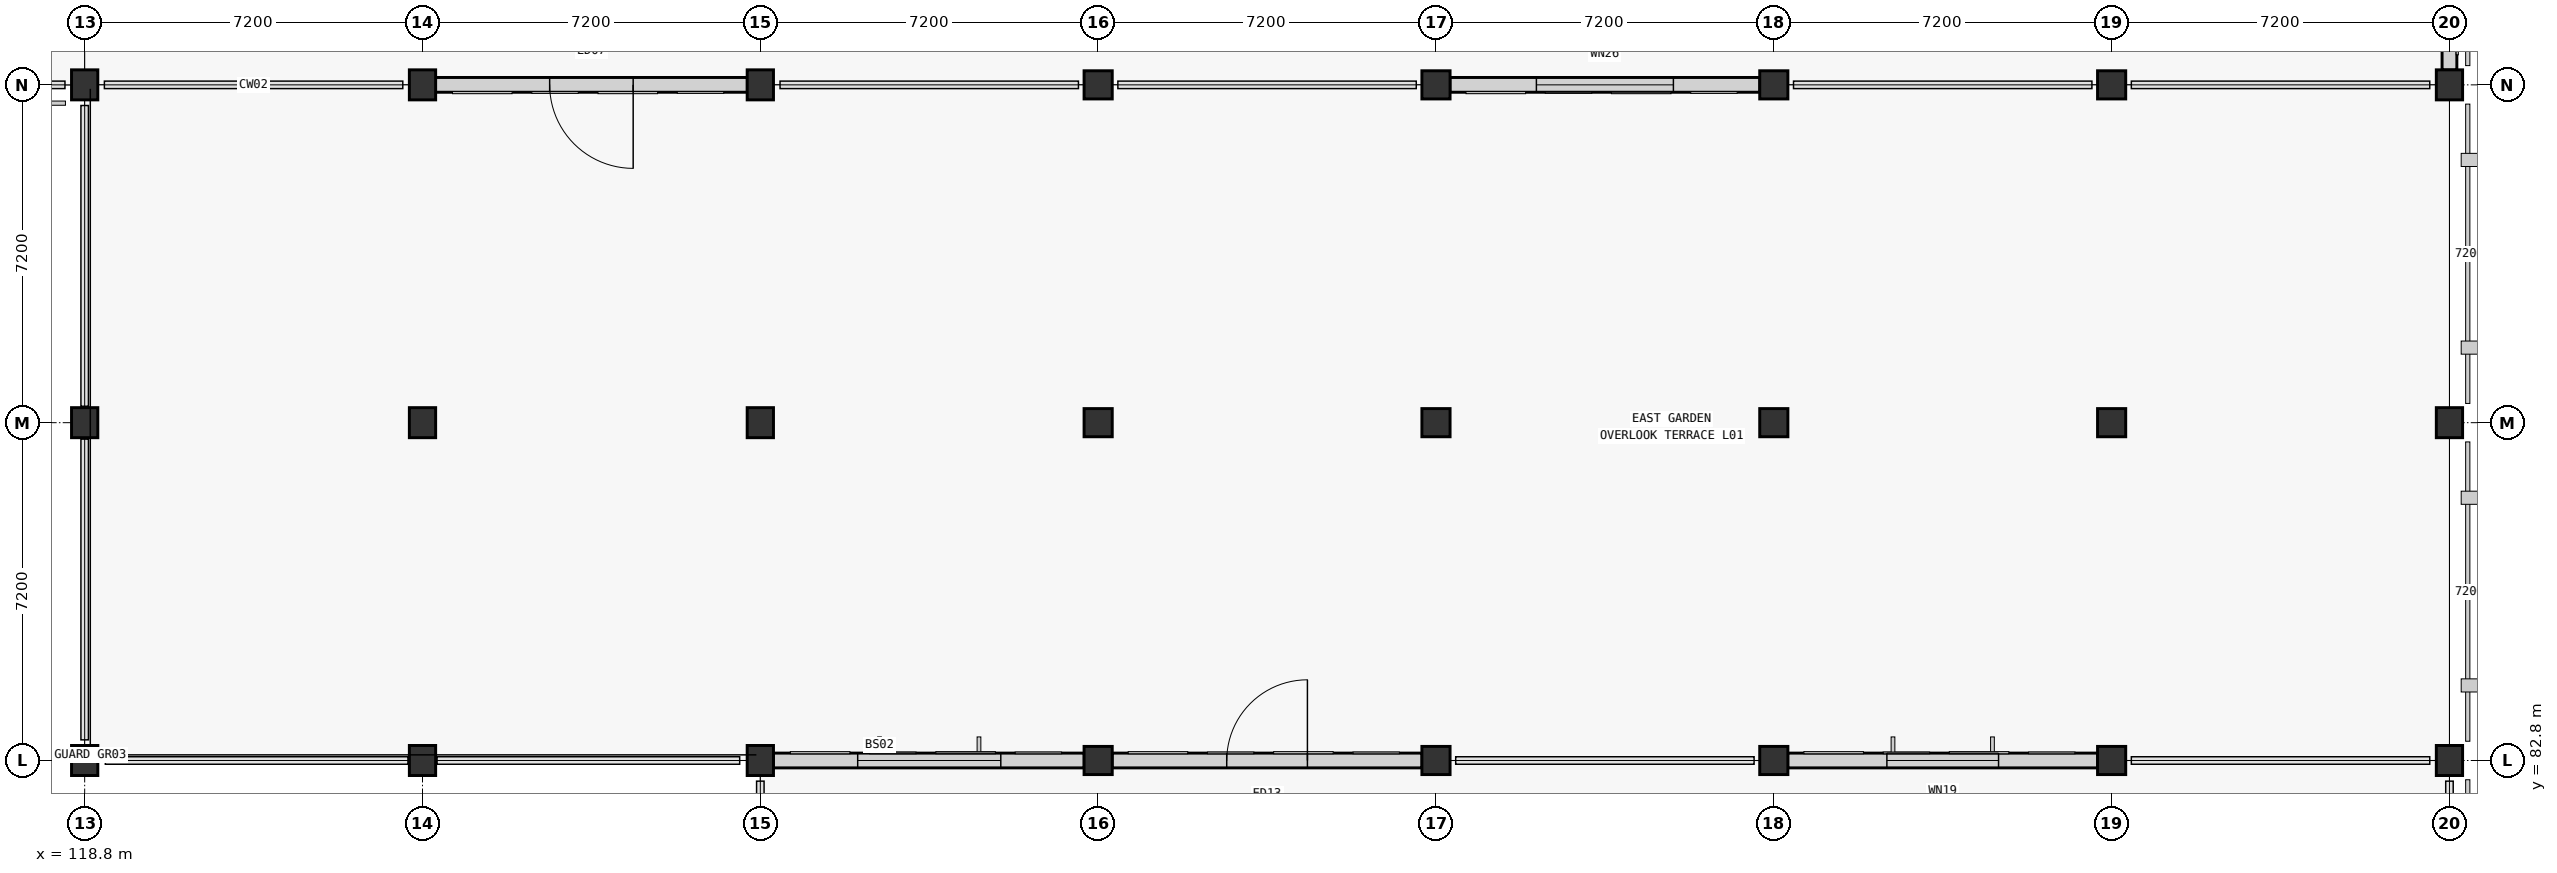
"""IFC4 building model, lengths in metres.
Left out: names, types, materials, properties, quantities, classifications, styles, units other than length and angle.
Written with IfcOpenShell. Run it as: python <this file> out.ifc"""

import sys

from ifc_helpers import new_model, si_unit, direction, frame, frame_2d, origin, origin_2d, place, context, subcontext, project, spatial, rectangle, extrude, element, fill, save


model = new_model("IFC4")
c1 = context("Model", 3, precision=1e-05, world=origin(), true_north=direction((0.0, 1.0)))
c2 = subcontext(c1, "Body", "Model", "MODEL_VIEW")
j1 = project(units=[si_unit("LENGTHUNIT", "METRE"), si_unit("PLANEANGLEUNIT", "RADIAN")], contexts=[c1])
p1 = place(None, origin())
s1 = spatial("IfcSite", under=j1, at=p1, CompositionType="ELEMENT")
p2 = place(p1, origin())
s2 = spatial("IfcBuilding", under=s1, at=p2, CompositionType="ELEMENT")
p3 = place(p2, frame((0.0, 0.0, 5.4)))
s3 = spatial("IfcBuildingStorey", under=s2, at=p3, CompositionType="ELEMENT", Elevation=5.4)
for number, where, z_axis, x_axis in (
    (1, (118.8, 82.8, 0.0), (0.0, 0.0, 1.0), (1.0, 0.0, 0.0)),
    (2, (118.8, 90.0, 0.0), (0.0, 0.0, 1.0), (1.0, 0.0, 0.0)),
    (3, (118.8, 97.2, 0.0), (0.0, 0.0, 1.0), (1.0, 0.0, 0.0)),
    (4, (126.0, 82.8, 0.0), (0.0, 0.0, 1.0), (1.0, 0.0, 0.0)),
    (5, (126.0, 90.0, 0.0), (0.0, 0.0, 1.0), (1.0, 0.0, 0.0)),
    (6, (126.0, 97.2, 0.0), (0.0, 0.0, 1.0), (1.0, 0.0, 0.0)),
    (7, (133.2, 82.8, 0.0), (0.0, 0.0, 1.0), (1.0, 0.0, 0.0)),
    (8, (133.2, 90.0, 0.0), (0.0, 0.0, 1.0), (1.0, 0.0, 0.0)),
    (9, (133.2, 97.2, 0.0), (0.0, 0.0, 1.0), (1.0, 0.0, 0.0)),
):
    element("IfcColumn", number, at=place(p3, frame(where, z_axis=z_axis, x_axis=x_axis)), inside=s3, PredefinedType="COLUMN", context=c2, shape_type="SweptSolid", body=[
        extrude(rectangle(XDim=0.56, YDim=0.64, at=origin_2d()), origin(), (0.0, 0.0, 1.0), 5.4),
    ])
for number, where, z_axis, x_axis in (
    (10, (140.4, 82.8, 0.0), (0.0, 0.0, 1.0), (1.0, 0.0, 0.0)),
    (11, (140.4, 90.0, 0.0), (0.0, 0.0, 1.0), (1.0, 0.0, 0.0)),
    (12, (140.4, 97.2, 0.0), (0.0, 0.0, 1.0), (1.0, 0.0, 0.0)),
    (13, (147.6, 82.8, 0.0), (0.0, 0.0, 1.0), (1.0, 0.0, 0.0)),
    (14, (147.6, 90.0, 0.0), (0.0, 0.0, 1.0), (1.0, 0.0, 0.0)),
    (15, (147.6, 97.2, 0.0), (0.0, 0.0, 1.0), (1.0, 0.0, 0.0)),
    (16, (154.8, 82.8, 0.0), (0.0, 0.0, 1.0), (1.0, 0.0, 0.0)),
    (17, (154.8, 90.0, 0.0), (0.0, 0.0, 1.0), (1.0, 0.0, 0.0)),
    (18, (154.8, 97.2, 0.0), (0.0, 0.0, 1.0), (1.0, 0.0, 0.0)),
    (19, (162.0, 82.8, 0.0), (0.0, 0.0, 1.0), (1.0, 0.0, 0.0)),
    (20, (162.0, 90.0, 0.0), (0.0, 0.0, 1.0), (1.0, 0.0, 0.0)),
    (21, (162.0, 97.2, 0.0), (0.0, 0.0, 1.0), (1.0, 0.0, 0.0)),
):
    element("IfcColumn", number, at=place(p3, frame(where, z_axis=z_axis, x_axis=x_axis)), inside=s3, PredefinedType="COLUMN", context=c2, shape_type="SweptSolid", body=[
        extrude(rectangle(XDim=0.6, YDim=0.6, at=origin_2d()), origin(), (0.0, 0.0, 1.0), 5.4),
    ])
for number, where, z_axis, x_axis in (
    (22, (169.2, 82.8, 0.0), (0.0, 0.0, 1.0), (1.0, 0.0, 0.0)),
    (23, (169.2, 90.0, 0.0), (0.0, 0.0, 1.0), (1.0, 0.0, 0.0)),
    (24, (169.2, 97.2, 0.0), (0.0, 0.0, 1.0), (1.0, 0.0, 0.0)),
):
    element("IfcColumn", number, at=place(p3, frame(where, z_axis=z_axis, x_axis=x_axis)), inside=s3, PredefinedType="COLUMN", context=c2, shape_type="SweptSolid", body=[
        extrude(rectangle(XDim=0.56, YDim=0.64, at=origin_2d()), origin(), (0.0, 0.0, 1.0), 5.4),
    ])
p4 = place(p3, frame((169.2, 104.084, 0.0), z_axis=(0.0, 0.0, 1.0), x_axis=(0.0, -1.0, 0.0)))
e25 = element("IfcWall", 25, at=p4, inside=s3, PredefinedType="STANDARD", context=c2, shape_type="SweptSolid", body=[
    extrude(rectangle(XDim=6.568, YDim=0.315, at=frame_2d((3.284, 0.0))), origin(), (0.0, 0.0, 1.0), 4.515),
])
p5 = place(p4, frame((2.374, 0.0, 0.9)))
e26 = element("IfcOpeningElement", 26, at=p5, cuts=e25, PredefinedType="OPENING", context=c2, shape_type="SweptSolid", body=[
    extrude(rectangle(XDim=1.82, YDim=1.84, at=frame_2d((0.91, 0.92))), frame((0.0, 0.157, 0.0), z_axis=(0.0, -1.0, 0.0), x_axis=(1.0, 0.0, 0.0)), (0.0, 0.0, 1.0), 0.315),
])
p6 = place(p3, frame((132.924, 97.2, 0.0), z_axis=(0.0, 0.0, 1.0), x_axis=(-1.0, 0.0, 0.0)))
e27 = element("IfcWall", 27, at=p6, inside=s3, PredefinedType="STANDARD", context=c2, shape_type="SweptSolid", body=[
    extrude(rectangle(XDim=6.648, YDim=0.315, at=frame_2d((3.324, 0.0))), origin(), (0.0, 0.0, 1.0), 4.475),
])
p7 = place(p6, frame((2.434, 0.0, 0.0)))
e28 = element("IfcOpeningElement", 28, at=p7, cuts=e27, PredefinedType="OPENING", context=c2, shape_type="SweptSolid", body=[
    extrude(rectangle(XDim=1.78, YDim=2.32, at=frame_2d((0.89, 1.16))), frame((0.0, 0.157, 0.0), z_axis=(0.0, -1.0, 0.0), x_axis=(1.0, 0.0, 0.0)), (0.0, 0.0, 1.0), 0.315),
])
p8 = place(p3, frame((154.504, 97.2, 0.0), z_axis=(0.0, 0.0, 1.0), x_axis=(-1.0, 0.0, 0.0)))
e29 = element("IfcWall", 29, at=p8, inside=s3, PredefinedType="STANDARD", context=c2, shape_type="SweptSolid", body=[
    extrude(rectangle(XDim=6.608, YDim=0.315, at=frame_2d((3.304, 0.0))), origin(), (0.0, 0.0, 1.0), 4.475),
])
p9 = place(p8, frame((1.844, 0.0, 0.9)))
e30 = element("IfcOpeningElement", 30, at=p9, cuts=e29, PredefinedType="OPENING", context=c2, shape_type="SweptSolid", body=[
    extrude(rectangle(XDim=2.92, YDim=2.52, at=frame_2d((1.46, 1.26))), frame((0.0, 0.157, 0.0), z_axis=(0.0, -1.0, 0.0), x_axis=(1.0, 0.0, 0.0)), (0.0, 0.0, 1.0), 0.315),
])
p10 = place(p3, frame((133.476, 82.8, 0.0), z_axis=(0.0, 0.0, 1.0), x_axis=(1.0, 0.0, 0.0)))
e31 = element("IfcWall", 31, at=p10, inside=s3, PredefinedType="STANDARD", context=c2, shape_type="SweptSolid", body=[
    extrude(rectangle(XDim=6.628, YDim=0.315, at=frame_2d((3.314, 0.0))), origin(), (0.0, 0.0, 1.0), 4.475),
])
p11 = place(p10, frame((1.799, 0.0, 0.9)))
e32 = element("IfcOpeningElement", 32, at=p11, cuts=e31, PredefinedType="OPENING", context=c2, shape_type="SweptSolid", body=[
    extrude(rectangle(XDim=3.05, YDim=1.62, at=frame_2d((1.525, 0.81))), frame((0.0, 0.157, 0.0), z_axis=(0.0, -1.0, 0.0), x_axis=(1.0, 0.0, 0.0)), (0.0, 0.0, 1.0), 0.315),
])
p12 = place(p3, frame((140.696, 82.8, 0.0), z_axis=(0.0, 0.0, 1.0), x_axis=(1.0, 0.0, 0.0)))
e33 = element("IfcWall", 33, at=p12, inside=s3, PredefinedType="STANDARD", context=c2, shape_type="SweptSolid", body=[
    extrude(rectangle(XDim=6.608, YDim=0.315, at=frame_2d((3.304, 0.0))), origin(), (0.0, 0.0, 1.0), 4.475),
])
p13 = place(p12, frame((2.444, 0.0, 0.0)))
e34 = element("IfcOpeningElement", 34, at=p13, cuts=e33, PredefinedType="OPENING", context=c2, shape_type="SweptSolid", body=[
    extrude(rectangle(XDim=1.72, YDim=2.28, at=frame_2d((0.86, 1.14))), frame((0.0, 0.157, 0.0), z_axis=(0.0, -1.0, 0.0), x_axis=(1.0, 0.0, 0.0)), (0.0, 0.0, 1.0), 0.315),
])
p14 = place(p3, frame((155.096, 82.8, 0.0), z_axis=(0.0, 0.0, 1.0), x_axis=(1.0, 0.0, 0.0)))
e35 = element("IfcWall", 35, at=p14, inside=s3, PredefinedType="STANDARD", context=c2, shape_type="SweptSolid", body=[
    extrude(rectangle(XDim=6.608, YDim=0.315, at=frame_2d((3.304, 0.0))), origin(), (0.0, 0.0, 1.0), 4.475),
])
p15 = place(p14, frame((2.114, 0.0, 0.9)))
e36 = element("IfcOpeningElement", 36, at=p15, cuts=e35, PredefinedType="OPENING", context=c2, shape_type="SweptSolid", body=[
    extrude(rectangle(XDim=2.38, YDim=1.42, at=frame_2d((1.19, 0.71))), frame((0.0, 0.157, 0.0), z_axis=(0.0, -1.0, 0.0), x_axis=(1.0, 0.0, 0.0)), (0.0, 0.0, 1.0), 0.315),
])
p16 = place(p7, origin())
e37 = element("IfcDoor", 37, at=p16, inside=s3, OperationType="SINGLE_SWING_LEFT", PredefinedType="DOOR", context=c2, shape_type="SweptSolid", body=[
    extrude(rectangle(XDim=1.78, YDim=2.32, at=frame_2d((0.89, 1.16))), frame((0.0, 0.025, 0.0), z_axis=(0.0, -1.0, 0.0), x_axis=(1.0, 0.0, 0.0)), (0.0, 0.0, 1.0), 0.05),
])
fill(e28, e37)
p17 = place(p9, origin())
e38 = element("IfcWindow", 38, at=p17, inside=s3, PartitioningType="SINGLE_PANEL", PredefinedType="WINDOW", context=c2, shape_type="SweptSolid", body=[
    extrude(rectangle(XDim=2.92, YDim=2.52, at=frame_2d((1.46, 1.26))), frame((0.0, 0.03, 0.0), z_axis=(0.0, -1.0, 0.0), x_axis=(1.0, 0.0, 0.0)), (0.0, 0.0, 1.0), 0.06),
])
fill(e30, e38)
p18 = place(p11, origin())
e39 = element("IfcWindow", 39, at=p18, inside=s3, PartitioningType="SINGLE_PANEL", PredefinedType="WINDOW", context=c2, shape_type="SweptSolid", body=[
    extrude(rectangle(XDim=3.05, YDim=1.62, at=frame_2d((1.525, 0.81))), frame((0.0, 0.03, 0.0), z_axis=(0.0, -1.0, 0.0), x_axis=(1.0, 0.0, 0.0)), (0.0, 0.0, 1.0), 0.06),
])
fill(e32, e39)
p19 = place(p13, origin())
e40 = element("IfcDoor", 40, at=p19, inside=s3, OperationType="SINGLE_SWING_RIGHT", PredefinedType="DOOR", context=c2, shape_type="SweptSolid", body=[
    extrude(rectangle(XDim=1.72, YDim=2.28, at=frame_2d((0.86, 1.14))), frame((0.0, 0.025, 0.0), z_axis=(0.0, -1.0, 0.0), x_axis=(1.0, 0.0, 0.0)), (0.0, 0.0, 1.0), 0.05),
])
fill(e34, e40)
p20 = place(p15, origin())
e41 = element("IfcWindow", 41, at=p20, inside=s3, PartitioningType="SINGLE_PANEL", PredefinedType="WINDOW", context=c2, shape_type="SweptSolid", body=[
    extrude(rectangle(XDim=2.38, YDim=1.42, at=frame_2d((1.19, 0.71))), frame((0.0, 0.03, 0.0), z_axis=(0.0, -1.0, 0.0), x_axis=(1.0, 0.0, 0.0)), (0.0, 0.0, 1.0), 0.06),
])
fill(e36, e41)
save(model, sys.argv[1])
